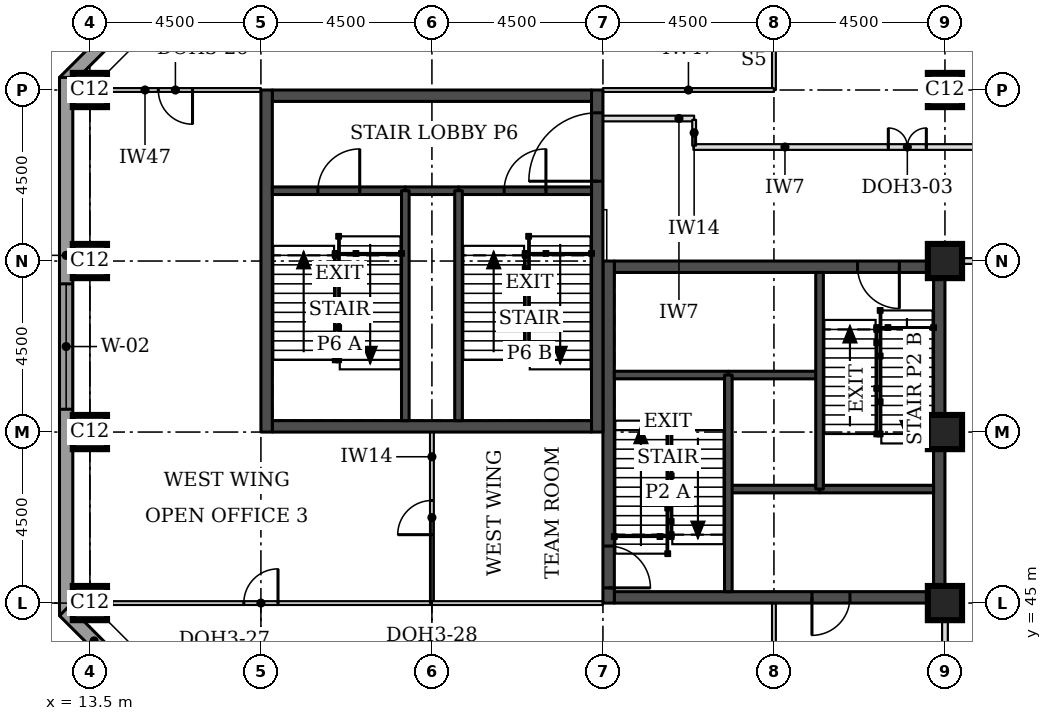
"""IFC4 building model, lengths in metres.
Left out: names, types, materials, properties, quantities, classifications, styles, units other than length and angle.
Written with IfcOpenShell. Run it as: python <this file> out.ifc"""

import sys

from ifc_helpers import new_model, si_unit, direction, frame, frame_2d, origin, origin_2d, place, context, subcontext, project, spatial, rectangle, extrude, element, fill, save


model = new_model("IFC4")
c1 = context("Model", 3, precision=1e-05, world=origin(), true_north=direction((0.0, 1.0)))
c2 = subcontext(c1, "Body", "Model", "MODEL_VIEW")
j1 = project(units=[si_unit("LENGTHUNIT", "METRE"), si_unit("PLANEANGLEUNIT", "RADIAN")], contexts=[c1])
p1 = place(None, origin())
s1 = spatial("IfcSite", under=j1, at=p1, CompositionType="ELEMENT")
p2 = place(p1, origin())
s2 = spatial("IfcBuilding", under=s1, at=p2, CompositionType="ELEMENT")
p3 = place(p2, frame((0.0, 0.0, 162.5)))
s3 = spatial("IfcBuildingStorey", under=s2, at=p3, CompositionType="ELEMENT", Elevation=162.5)
for number, where, z_axis, x_axis in (
    (1, (13.5, 45.0, 0.0), (0.0, 0.0, 1.0), (1.0, 0.0, 0.0)),
    (2, (36.0, 45.0, 0.0), (0.0, 0.0, 1.0), (1.0, 0.0, 0.0)),
    (3, (13.5, 49.5, 0.0), (0.0, 0.0, 1.0), (1.0, 0.0, 0.0)),
    (4, (36.0, 49.5, 0.0), (0.0, 0.0, 1.0), (1.0, 0.0, 0.0)),
    (5, (13.5, 54.0, 0.0), (0.0, 0.0, 1.0), (1.0, 0.0, 0.0)),
    (6, (36.0, 54.0, 0.0), (0.0, 0.0, 1.0), (1.0, 0.0, 0.0)),
    (7, (13.5, 58.5, 0.0), (0.0, 0.0, 1.0), (1.0, 0.0, 0.0)),
    (8, (36.0, 58.5, 0.0), (0.0, 0.0, 1.0), (1.0, 0.0, 0.0)),
):
    element("IfcColumn", number, at=place(p3, frame(where, z_axis=z_axis, x_axis=x_axis)), inside=s3, PredefinedType="COLUMN", context=c2, shape_type="SweptSolid", body=[
        extrude(rectangle(XDim=0.9, YDim=0.9, at=origin_2d()), origin(), (0.0, 0.0, 1.0), 3.7),
    ])
p4 = place(p3, frame((27.3, 45.15, 0.0), z_axis=(0.0, 0.0, 1.0), x_axis=(1.0, 0.0, 0.0)))
e9 = element("IfcWall", 9, at=p4, inside=s3, PredefinedType="SHEAR", context=c2, shape_type="SweptSolid", body=[
    extrude(rectangle(XDim=8.4, YDim=0.3, at=frame_2d((4.2, 0.0))), origin(), (0.0, 0.0, 1.0), 3.7),
])
p5 = place(p4, frame((5.2, 0.0, 0.0)))
e10 = element("IfcOpeningElement", 10, at=p5, cuts=e9, PredefinedType="OPENING", context=c2, shape_type="SweptSolid", body=[
    extrude(rectangle(XDim=1.0, YDim=2.1, at=frame_2d((0.5, 1.05))), frame((0.0, 0.16, 0.0), z_axis=(0.0, -1.0, 0.0), x_axis=(1.0, 0.0, 0.0)), (0.0, 0.0, 1.0), 0.32),
])
p6 = place(p3, frame((27.3, 53.85, 0.0), z_axis=(0.0, 0.0, 1.0), x_axis=(1.0, 0.0, 0.0)))
e11 = element("IfcWall", 11, at=p6, inside=s3, PredefinedType="SHEAR", context=c2, shape_type="SweptSolid", body=[
    extrude(rectangle(XDim=8.4, YDim=0.3, at=frame_2d((4.2, 0.0))), origin(), (0.0, 0.0, 1.0), 3.7),
])
p7 = place(p6, frame((6.4, 0.0, 0.0)))
e12 = element("IfcOpeningElement", 12, at=p7, cuts=e11, PredefinedType="OPENING", context=c2, shape_type="SweptSolid", body=[
    extrude(rectangle(XDim=1.1, YDim=2.1, at=frame_2d((0.55, 1.05))), frame((0.0, 0.16, 0.0), z_axis=(0.0, -1.0, 0.0), x_axis=(1.0, 0.0, 0.0)), (0.0, 0.0, 1.0), 0.32),
])
p8 = place(p3, frame((27.15, 45.0, 0.0), z_axis=(0.0, 0.0, 1.0), x_axis=(0.0, 1.0, 0.0)))
e13 = element("IfcWall", 13, at=p8, inside=s3, PredefinedType="SHEAR", context=c2, shape_type="SweptSolid", body=[
    extrude(rectangle(XDim=9.0, YDim=0.3, at=frame_2d((4.5, 0.0))), origin(), (0.0, 0.0, 1.0), 3.7),
])
p9 = place(p8, frame((0.4, 0.0, 0.0)))
e14 = element("IfcOpeningElement", 14, at=p9, cuts=e13, PredefinedType="OPENING", context=c2, shape_type="SweptSolid", body=[
    extrude(rectangle(XDim=1.1, YDim=2.1, at=frame_2d((0.55, 1.05))), frame((0.0, 0.16, 0.0), z_axis=(0.0, -1.0, 0.0), x_axis=(1.0, 0.0, 0.0)), (0.0, 0.0, 1.0), 0.32),
])
p10 = place(p3, frame((35.85, 45.0, 0.0), z_axis=(0.0, 0.0, 1.0), x_axis=(0.0, 1.0, 0.0)))
e15 = element("IfcWall", 15, at=p10, inside=s3, PredefinedType="SHEAR", context=c2, shape_type="SweptSolid", body=[
    extrude(rectangle(XDim=9.0, YDim=0.3, at=frame_2d((4.5, 0.0))), origin(), (0.0, 0.0, 1.0), 3.7),
])
for number, where, z_axis, x_axis in (
    (16, (18.3, 49.65, 0.0), (0.0, 0.0, 1.0), (1.0, 0.0, 0.0)),
    (17, (18.3, 58.35, 0.0), (0.0, 0.0, 1.0), (1.0, 0.0, 0.0)),
):
    element("IfcWall", number, at=place(p3, frame(where, z_axis=z_axis, x_axis=x_axis)), inside=s3, PredefinedType="SHEAR", context=c2, shape_type="SweptSolid", body=[
        extrude(rectangle(XDim=8.4, YDim=0.3, at=frame_2d((4.2, 0.0))), origin(), (0.0, 0.0, 1.0), 3.7),
    ])
p11 = place(p3, frame((18.15, 49.5, 0.0), z_axis=(0.0, 0.0, 1.0), x_axis=(0.0, 1.0, 0.0)))
e18 = element("IfcWall", 18, at=p11, inside=s3, PredefinedType="SHEAR", context=c2, shape_type="SweptSolid", body=[
    extrude(rectangle(XDim=9.0, YDim=0.3, at=frame_2d((4.5, 0.0))), origin(), (0.0, 0.0, 1.0), 3.7),
])
p12 = place(p3, frame((26.85, 49.5, 0.0), z_axis=(0.0, 0.0, 1.0), x_axis=(0.0, 1.0, 0.0)))
e19 = element("IfcWall", 19, at=p12, inside=s3, PredefinedType="SHEAR", context=c2, shape_type="SweptSolid", body=[
    extrude(rectangle(XDim=9.0, YDim=0.3, at=frame_2d((4.5, 0.0))), origin(), (0.0, 0.0, 1.0), 3.7),
])
p13 = place(p12, frame((6.6, 0.0, 0.0)))
e20 = element("IfcOpeningElement", 20, at=p13, cuts=e19, PredefinedType="OPENING", context=c2, shape_type="SweptSolid", body=[
    extrude(rectangle(XDim=1.8, YDim=2.1, at=frame_2d((0.9, 1.05))), frame((0.0, 0.16, 0.0), z_axis=(0.0, -1.0, 0.0), x_axis=(1.0, 0.0, 0.0)), (0.0, 0.0, 1.0), 0.32),
])
p14 = place(p3, frame((17.792, 63.676, 0.0), z_axis=(0.0, 0.0, 1.0), x_axis=(-0.707106781187, -0.707106781187, 0.0)))
e21 = element("IfcWall", 21, at=p14, inside=s3, PredefinedType="STANDARD", context=c2, shape_type="SweptSolid", body=[
    extrude(rectangle(XDim=7.027, YDim=0.35, at=frame_2d((3.513, 0.0))), origin(), (0.0, 0.0, 1.0), 3.525),
])
p15 = place(p14, frame((1.863, 0.0, 0.9)))
e22 = element("IfcOpeningElement", 22, at=p15, cuts=e21, PredefinedType="OPENING", context=c2, shape_type="SweptSolid", body=[
    extrude(rectangle(XDim=3.3, YDim=1.9, at=frame_2d((1.65, 0.95))), frame((0.0, 0.185, 0.0), z_axis=(0.0, -1.0, 0.0), x_axis=(1.0, 0.0, 0.0)), (0.0, 0.0, 1.0), 0.37),
])
p16 = place(p3, frame((12.875, 58.831, 0.0), z_axis=(0.0, 0.0, 1.0), x_axis=(0.0, -1.0, 0.0)))
e23 = element("IfcWall", 23, at=p16, inside=s3, PredefinedType="STANDARD", context=c2, shape_type="SweptSolid", body=[
    extrude(rectangle(XDim=14.163, YDim=0.35, at=frame_2d((7.081, 0.0))), origin(), (0.0, 0.0, 1.0), 3.525),
])
p17 = place(p16, frame((5.431, 0.0, 0.9)))
e24 = element("IfcOpeningElement", 24, at=p17, cuts=e23, PredefinedType="OPENING", context=c2, shape_type="SweptSolid", body=[
    extrude(rectangle(XDim=3.3, YDim=1.9, at=frame_2d((1.65, 0.95))), frame((0.0, 0.185, 0.0), z_axis=(0.0, -1.0, 0.0), x_axis=(1.0, 0.0, 0.0)), (0.0, 0.0, 1.0), 0.37),
])
p18 = place(p3, frame((12.824, 44.792, 0.0), z_axis=(0.0, 0.0, 1.0), x_axis=(0.707106781187, -0.707106781187, 0.0)))
e25 = element("IfcWall", 25, at=p18, inside=s3, PredefinedType="STANDARD", context=c2, shape_type="SweptSolid", body=[
    extrude(rectangle(XDim=7.027, YDim=0.35, at=frame_2d((3.513, 0.0))), origin(), (0.0, 0.0, 1.0), 3.525),
])
p19 = place(p18, frame((1.863, 0.0, 0.9)))
e26 = element("IfcOpeningElement", 26, at=p19, cuts=e25, PredefinedType="OPENING", context=c2, shape_type="SweptSolid", body=[
    extrude(rectangle(XDim=3.3, YDim=1.9, at=frame_2d((1.65, 0.95))), frame((0.0, 0.185, 0.0), z_axis=(0.0, -1.0, 0.0), x_axis=(1.0, 0.0, 0.0)), (0.0, 0.0, 1.0), 0.37),
])
p20 = place(p3, frame((36.45, 54.0, 0.0), z_axis=(0.0, 0.0, 1.0), x_axis=(1.0, 0.0, 0.0)))
e27 = element("IfcWall", 27, at=p20, inside=s3, PredefinedType="PARTITIONING", context=c2, shape_type="SweptSolid", body=[
    extrude(rectangle(XDim=5.625, YDim=0.15, at=frame_2d((2.812, 0.0))), origin(), (0.0, 0.0, 1.0), 3.55),
])
p21 = place(p3, frame((29.38, 57.0, 0.0), z_axis=(0.0, 0.0, 1.0), x_axis=(1.0, 0.0, 0.0)))
e28 = element("IfcWall", 28, at=p21, inside=s3, PredefinedType="PARTITIONING", context=c2, shape_type="SweptSolid", body=[
    extrude(rectangle(XDim=9.62, YDim=0.15, at=frame_2d((4.81, 0.0))), origin(), (0.0, 0.0, 1.0), 3.55),
])
p22 = place(p21, frame((5.13, 0.0, 0.0)))
e29 = element("IfcOpeningElement", 29, at=p22, cuts=e28, PredefinedType="OPENING", context=c2, shape_type="SweptSolid", body=[
    extrude(rectangle(XDim=1.0, YDim=2.1, at=frame_2d((0.5, 1.05))), frame((0.0, 0.085, 0.0), z_axis=(0.0, -1.0, 0.0), x_axis=(1.0, 0.0, 0.0)), (0.0, 0.0, 1.0), 0.17),
])
p23 = place(p3, frame((36.0, 40.95, 0.0), z_axis=(0.0, 0.0, 1.0), x_axis=(0.0, 1.0, 0.0)))
e30 = element("IfcWall", 30, at=p23, inside=s3, PredefinedType="PARTITIONING", context=c2, shape_type="SweptSolid", body=[
    extrude(rectangle(XDim=3.63, YDim=0.15, at=frame_2d((1.815, 0.0))), origin(), (0.0, 0.0, 1.0), 2.8),
])
p24 = place(p23, frame((1.4, 0.0, 0.0)))
e31 = element("IfcOpeningElement", 31, at=p24, cuts=e30, PredefinedType="OPENING", context=c2, shape_type="SweptSolid", body=[
    extrude(rectangle(XDim=0.9, YDim=2.1, at=frame_2d((0.45, 1.05))), frame((0.0, 0.085, 0.0), z_axis=(0.0, -1.0, 0.0), x_axis=(1.0, 0.0, 0.0)), (0.0, 0.0, 1.0), 0.17),
])
p25 = place(p3, frame((31.5, 63.0, 0.0), z_axis=(0.0, 0.0, 1.0), x_axis=(0.0, -1.0, 0.0)))
e32 = element("IfcWall", 32, at=p25, inside=s3, PredefinedType="PARTITIONING", context=c2, shape_type="SweptSolid", body=[
    extrude(rectangle(XDim=4.5, YDim=0.1, at=frame_2d((2.25, 0.0))), origin(), (0.0, 0.0, 1.0), 3.55),
])
p26 = place(p25, frame((1.8, 0.0, 0.0)))
e33 = element("IfcOpeningElement", 33, at=p26, cuts=e32, PredefinedType="OPENING", context=c2, shape_type="SweptSolid", body=[
    extrude(rectangle(XDim=0.9, YDim=2.1, at=frame_2d((0.45, 1.05))), frame((0.0, 0.06, 0.0), z_axis=(0.0, -1.0, 0.0), x_axis=(1.0, 0.0, 0.0)), (0.0, 0.0, 1.0), 0.12),
])
p27 = place(p3, frame((31.5, 58.5, 0.0), z_axis=(0.0, 0.0, 1.0), x_axis=(-1.0, 0.0, 0.0)))
e34 = element("IfcWall", 34, at=p27, inside=s3, PredefinedType="PARTITIONING", context=c2, shape_type="SweptSolid", body=[
    extrude(rectangle(XDim=4.5, YDim=0.1, at=frame_2d((2.25, 0.0))), origin(), (0.0, 0.0, 1.0), 2.55),
])
p28 = place(p3, frame((13.5, 58.5, 0.0), z_axis=(0.0, 0.0, 1.0), x_axis=(1.0, 0.0, 0.0)))
e35 = element("IfcWall", 35, at=p28, inside=s3, PredefinedType="PARTITIONING", context=c2, shape_type="SweptSolid", body=[
    extrude(rectangle(XDim=4.5, YDim=0.1, at=frame_2d((2.25, 0.0))), origin(), (0.0, 0.0, 1.0), 2.55),
])
p29 = place(p28, frame((1.8, 0.0, 0.0)))
e36 = element("IfcOpeningElement", 36, at=p29, cuts=e35, PredefinedType="OPENING", context=c2, shape_type="SweptSolid", body=[
    extrude(rectangle(XDim=0.9, YDim=2.1, at=frame_2d((0.45, 1.05))), frame((0.0, 0.06, 0.0), z_axis=(0.0, -1.0, 0.0), x_axis=(1.0, 0.0, 0.0)), (0.0, 0.0, 1.0), 0.12),
])
p30 = place(p3, frame((22.5, 45.0, 0.0), z_axis=(0.0, 0.0, 1.0), x_axis=(-1.0, 0.0, 0.0)))
e37 = element("IfcWall", 37, at=p30, inside=s3, PredefinedType="PARTITIONING", context=c2, shape_type="SweptSolid", body=[
    extrude(rectangle(XDim=9.0, YDim=0.1, at=frame_2d((4.5, 0.0))), origin(), (0.0, 0.0, 1.0), 2.55),
])
p31 = place(p30, frame((4.05, 0.0, 0.0)))
e38 = element("IfcOpeningElement", 38, at=p31, cuts=e37, PredefinedType="OPENING", context=c2, shape_type="SweptSolid", body=[
    extrude(rectangle(XDim=0.9, YDim=2.1, at=frame_2d((0.45, 1.05))), frame((0.0, 0.06, 0.0), z_axis=(0.0, -1.0, 0.0), x_axis=(1.0, 0.0, 0.0)), (0.0, 0.0, 1.0), 0.12),
])
p32 = place(p3, frame((22.5, 49.5, 0.0), z_axis=(0.0, 0.0, 1.0), x_axis=(0.0, -1.0, 0.0)))
e39 = element("IfcWall", 39, at=p32, inside=s3, PredefinedType="PARTITIONING", context=c2, shape_type="SweptSolid", body=[
    extrude(rectangle(XDim=4.5, YDim=0.1, at=frame_2d((2.25, 0.0))), origin(), (0.0, 0.0, 1.0), 3.55),
])
p33 = place(p32, frame((1.8, 0.0, 0.0)))
e40 = element("IfcOpeningElement", 40, at=p33, cuts=e39, PredefinedType="OPENING", context=c2, shape_type="SweptSolid", body=[
    extrude(rectangle(XDim=0.9, YDim=2.1, at=frame_2d((0.45, 1.05))), frame((0.0, 0.06, 0.0), z_axis=(0.0, -1.0, 0.0), x_axis=(1.0, 0.0, 0.0)), (0.0, 0.0, 1.0), 0.12),
])
p34 = place(p3, frame((22.5, 45.0, 0.0), z_axis=(0.0, 0.0, 1.0), x_axis=(1.0, 0.0, 0.0)))
e41 = element("IfcWall", 41, at=p34, inside=s3, PredefinedType="PARTITIONING", context=c2, shape_type="SweptSolid", body=[
    extrude(rectangle(XDim=4.5, YDim=0.1, at=frame_2d((2.25, 0.0))), origin(), (0.0, 0.0, 1.0), 2.55),
])
p35 = place(p3, frame((31.5, 45.0, 0.0), z_axis=(0.0, 0.0, 1.0), x_axis=(0.0, -1.0, 0.0)))
e42 = element("IfcWall", 42, at=p35, inside=s3, PredefinedType="PARTITIONING", context=c2, shape_type="SweptSolid", body=[
    extrude(rectangle(XDim=4.5, YDim=0.1, at=frame_2d((2.25, 0.0))), origin(), (0.0, 0.0, 1.0), 3.55),
])
p36 = place(p35, frame((1.8, 0.0, 0.0)))
e43 = element("IfcOpeningElement", 43, at=p36, cuts=e42, PredefinedType="OPENING", context=c2, shape_type="SweptSolid", body=[
    extrude(rectangle(XDim=0.9, YDim=2.1, at=frame_2d((0.45, 1.05))), frame((0.0, 0.06, 0.0), z_axis=(0.0, -1.0, 0.0), x_axis=(1.0, 0.0, 0.0)), (0.0, 0.0, 1.0), 0.12),
])
p37 = place(p3, frame((27.0, 57.75, 0.0), z_axis=(0.0, 0.0, 1.0), x_axis=(1.0, 0.0, 0.0)))
e44 = element("IfcWall", 44, at=p37, inside=s3, PredefinedType="PARTITIONING", context=c2, shape_type="SweptSolid", body=[
    extrude(rectangle(XDim=2.4, YDim=0.15, at=frame_2d((1.2, 0.0))), origin(), (0.0, 0.0, 1.0), 3.55),
])
p38 = place(p3, frame((29.4, 57.715, 0.0), z_axis=(0.0, 0.0, 1.0), x_axis=(0.0, -1.0, 0.0)))
e45 = element("IfcWall", 45, at=p38, inside=s3, PredefinedType="PARTITIONING", context=c2, shape_type="SweptSolid", body=[
    extrude(rectangle(XDim=0.68, YDim=0.1, at=frame_2d((0.34, 0.0))), origin(), (0.0, 0.0, 1.0), 3.55),
])
p39 = place(p3, frame((30.3, 48.0, 0.0), z_axis=(0.0, 0.0, 1.0), x_axis=(1.0, 0.0, 0.0)))
e46 = element("IfcWall", 46, at=p39, inside=s3, PredefinedType="SOLIDWALL", context=c2, shape_type="SweptSolid", body=[
    extrude(rectangle(XDim=2.4, YDim=0.2, at=frame_2d((1.2, 0.0))), origin(), (0.0, 0.0, 1.0), 3.55),
])
p40 = place(p3, frame((32.7, 48.0, 0.0), z_axis=(0.0, 0.0, 1.0), x_axis=(1.0, 0.0, 0.0)))
e47 = element("IfcWall", 47, at=p40, inside=s3, PredefinedType="SOLIDWALL", context=c2, shape_type="SweptSolid", body=[
    extrude(rectangle(XDim=3.0, YDim=0.2, at=frame_2d((1.5, 0.0))), origin(), (0.0, 0.0, 1.0), 3.55),
])
p41 = place(p3, frame((30.3, 51.0, 0.0), z_axis=(0.0, 0.0, 1.0), x_axis=(1.0, 0.0, 0.0)))
e48 = element("IfcWall", 48, at=p41, inside=s3, PredefinedType="SOLIDWALL", context=c2, shape_type="SweptSolid", body=[
    extrude(rectangle(XDim=2.4, YDim=0.2, at=frame_2d((1.2, 0.0))), origin(), (0.0, 0.0, 1.0), 3.7),
])
p42 = place(p3, frame((27.3, 51.0, 0.0), z_axis=(0.0, 0.0, 1.0), x_axis=(1.0, 0.0, 0.0)))
e49 = element("IfcWall", 49, at=p42, inside=s3, PredefinedType="SOLIDWALL", context=c2, shape_type="SweptSolid", body=[
    extrude(rectangle(XDim=3.0, YDim=0.2, at=frame_2d((1.5, 0.0))), origin(), (0.0, 0.0, 1.0), 3.55),
])
for number, where, z_axis, x_axis in (
    (50, (30.3, 45.3, 0.0), (0.0, 0.0, 1.0), (0.0, 1.0, 0.0)),
    (51, (32.7, 48.0, 0.0), (0.0, 0.0, 1.0), (0.0, 1.0, 0.0)),
):
    element("IfcWall", number, at=place(p3, frame(where, z_axis=z_axis, x_axis=x_axis)), inside=s3, PredefinedType="SOLIDWALL", context=c2, shape_type="SweptSolid", body=[
        extrude(rectangle(XDim=5.7, YDim=0.2, at=frame_2d((2.85, 0.0))), origin(), (0.0, 0.0, 1.0), 3.55),
    ])
p43 = place(p3, frame((21.8, 55.85, 0.0), z_axis=(0.0, 0.0, 1.0), x_axis=(1.0, 0.0, 0.0)))
e52 = element("IfcWall", 52, at=p43, inside=s3, PredefinedType="SOLIDWALL", context=c2, shape_type="SweptSolid", body=[
    extrude(rectangle(XDim=1.4, YDim=0.2, at=frame_2d((0.7, 0.0))), origin(), (0.0, 0.0, 1.0), 3.55),
])
p44 = place(p3, frame((18.3, 55.85, 0.0), z_axis=(0.0, 0.0, 1.0), x_axis=(1.0, 0.0, 0.0)))
e53 = element("IfcWall", 53, at=p44, inside=s3, PredefinedType="SOLIDWALL", context=c2, shape_type="SweptSolid", body=[
    extrude(rectangle(XDim=3.5, YDim=0.2, at=frame_2d((1.75, 0.0))), origin(), (0.0, 0.0, 1.0), 3.55),
])
p45 = place(p44, frame((1.2, 0.0, 0.0)))
e54 = element("IfcOpeningElement", 54, at=p45, cuts=e53, PredefinedType="OPENING", context=c2, shape_type="SweptSolid", body=[
    extrude(rectangle(XDim=1.1, YDim=2.1, at=frame_2d((0.55, 1.05))), frame((0.0, 0.11, 0.0), z_axis=(0.0, -1.0, 0.0), x_axis=(1.0, 0.0, 0.0)), (0.0, 0.0, 1.0), 0.22),
])
p46 = place(p3, frame((23.2, 55.85, 0.0), z_axis=(0.0, 0.0, 1.0), x_axis=(1.0, 0.0, 0.0)))
e55 = element("IfcWall", 55, at=p46, inside=s3, PredefinedType="SOLIDWALL", context=c2, shape_type="SweptSolid", body=[
    extrude(rectangle(XDim=3.5, YDim=0.2, at=frame_2d((1.75, 0.0))), origin(), (0.0, 0.0, 1.0), 3.55),
])
p47 = place(p46, frame((1.2, 0.0, 0.0)))
e56 = element("IfcOpeningElement", 56, at=p47, cuts=e55, PredefinedType="OPENING", context=c2, shape_type="SweptSolid", body=[
    extrude(rectangle(XDim=1.1, YDim=2.1, at=frame_2d((0.55, 1.05))), frame((0.0, 0.11, 0.0), z_axis=(0.0, -1.0, 0.0), x_axis=(1.0, 0.0, 0.0)), (0.0, 0.0, 1.0), 0.22),
])
for number, where, z_axis, x_axis in (
    (57, (21.8, 49.8, 0.0), (0.0, 0.0, 1.0), (0.0, 1.0, 0.0)),
    (58, (23.2, 49.8, 0.0), (0.0, 0.0, 1.0), (0.0, 1.0, 0.0)),
):
    element("IfcWall", number, at=place(p3, frame(where, z_axis=z_axis, x_axis=x_axis)), inside=s3, PredefinedType="SOLIDWALL", context=c2, shape_type="SweptSolid", body=[
        extrude(rectangle(XDim=6.05, YDim=0.2, at=frame_2d((3.025, 0.0))), origin(), (0.0, 0.0, 1.0), 3.55),
    ])
p48 = place(p17, origin())
e59 = element("IfcWindow", 59, at=p48, inside=s3, PartitioningType="SINGLE_PANEL", PredefinedType="WINDOW", context=c2, shape_type="SweptSolid", body=[
    extrude(rectangle(XDim=3.3, YDim=1.9, at=frame_2d((1.65, 0.95))), frame((0.0, 0.085, 0.0), z_axis=(0.0, -1.0, 0.0), x_axis=(1.0, 0.0, 0.0)), (0.0, 0.0, 1.0), 0.06),
])
fill(e24, e59)
p49 = place(p22, origin())
e60 = element("IfcDoor", 60, at=p49, inside=s3, OperationType="DOUBLE_DOOR_SINGLE_SWING", PredefinedType="DOOR", context=c2, shape_type="SweptSolid", body=[
    extrude(rectangle(XDim=1.0, YDim=2.1, at=frame_2d((0.5, 1.05))), frame((0.0, 0.025, 0.0), z_axis=(0.0, -1.0, 0.0), x_axis=(1.0, 0.0, 0.0)), (0.0, 0.0, 1.0), 0.05),
])
fill(e29, e60)
p50 = place(p29, frame((0.9, 0.0, 0.0), z_axis=(0.0, 0.0, 1.0), x_axis=(-1.0, 0.0, 0.0)))
e61 = element("IfcDoor", 61, at=p50, inside=s3, OperationType="SINGLE_SWING_LEFT", PredefinedType="DOOR", context=c2, shape_type="SweptSolid", body=[
    extrude(rectangle(XDim=0.9, YDim=2.1, at=frame_2d((0.45, 1.05))), frame((0.0, 0.025, 0.0), z_axis=(0.0, -1.0, 0.0), x_axis=(1.0, 0.0, 0.0)), (0.0, 0.0, 1.0), 0.05),
])
fill(e36, e61)
p51 = place(p31, frame((0.9, 0.0, 0.0), z_axis=(0.0, 0.0, 1.0), x_axis=(-1.0, 0.0, 0.0)))
e62 = element("IfcDoor", 62, at=p51, inside=s3, OperationType="SINGLE_SWING_RIGHT", PredefinedType="DOOR", context=c2, shape_type="SweptSolid", body=[
    extrude(rectangle(XDim=0.9, YDim=2.1, at=frame_2d((0.45, 1.05))), frame((0.0, 0.025, 0.0), z_axis=(0.0, -1.0, 0.0), x_axis=(1.0, 0.0, 0.0)), (0.0, 0.0, 1.0), 0.05),
])
fill(e38, e62)
p52 = place(p33, frame((0.9, 0.0, 0.0), z_axis=(0.0, 0.0, 1.0), x_axis=(-1.0, 0.0, 0.0)))
e63 = element("IfcDoor", 63, at=p52, inside=s3, OperationType="SINGLE_SWING_LEFT", PredefinedType="DOOR", context=c2, shape_type="SweptSolid", body=[
    extrude(rectangle(XDim=0.9, YDim=2.1, at=frame_2d((0.45, 1.05))), frame((0.0, 0.025, 0.0), z_axis=(0.0, -1.0, 0.0), x_axis=(1.0, 0.0, 0.0)), (0.0, 0.0, 1.0), 0.05),
])
fill(e40, e63)
p53 = place(p9, frame((1.1, 0.0, 0.0), z_axis=(0.0, 0.0, 1.0), x_axis=(-1.0, 0.0, 0.0)))
e64 = element("IfcDoor", 64, at=p53, inside=s3, OperationType="SINGLE_SWING_RIGHT", PredefinedType="DOOR", context=c2, shape_type="SweptSolid", body=[
    extrude(rectangle(XDim=1.1, YDim=2.1, at=frame_2d((0.55, 1.05))), frame((0.0, 0.025, 0.0), z_axis=(0.0, -1.0, 0.0), x_axis=(1.0, 0.0, 0.0)), (0.0, 0.0, 1.0), 0.05),
])
fill(e14, e64)
p54 = place(p7, frame((1.1, 0.0, 0.0), z_axis=(0.0, 0.0, 1.0), x_axis=(-1.0, 0.0, 0.0)))
e65 = element("IfcDoor", 65, at=p54, inside=s3, OperationType="SINGLE_SWING_LEFT", PredefinedType="DOOR", context=c2, shape_type="SweptSolid", body=[
    extrude(rectangle(XDim=1.1, YDim=2.1, at=frame_2d((0.55, 1.05))), frame((0.0, 0.025, 0.0), z_axis=(0.0, -1.0, 0.0), x_axis=(1.0, 0.0, 0.0)), (0.0, 0.0, 1.0), 0.05),
])
fill(e12, e65)
p55 = place(p5, frame((1.0, 0.0, 0.0), z_axis=(0.0, 0.0, 1.0), x_axis=(-1.0, 0.0, 0.0)))
e66 = element("IfcDoor", 66, at=p55, inside=s3, OperationType="SINGLE_SWING_RIGHT", PredefinedType="DOOR", context=c2, shape_type="SweptSolid", body=[
    extrude(rectangle(XDim=1.0, YDim=2.1, at=frame_2d((0.5, 1.05))), frame((0.0, 0.025, 0.0), z_axis=(0.0, -1.0, 0.0), x_axis=(1.0, 0.0, 0.0)), (0.0, 0.0, 1.0), 0.05),
])
fill(e10, e66)
p56 = place(p45, origin())
e67 = element("IfcDoor", 67, at=p56, inside=s3, OperationType="SINGLE_SWING_RIGHT", PredefinedType="DOOR", context=c2, shape_type="SweptSolid", body=[
    extrude(rectangle(XDim=1.1, YDim=2.1, at=frame_2d((0.55, 1.05))), frame((0.0, 0.025, 0.0), z_axis=(0.0, -1.0, 0.0), x_axis=(1.0, 0.0, 0.0)), (0.0, 0.0, 1.0), 0.05),
])
fill(e54, e67)
p57 = place(p47, origin())
e68 = element("IfcDoor", 68, at=p57, inside=s3, OperationType="SINGLE_SWING_RIGHT", PredefinedType="DOOR", context=c2, shape_type="SweptSolid", body=[
    extrude(rectangle(XDim=1.1, YDim=2.1, at=frame_2d((0.55, 1.05))), frame((0.0, 0.025, 0.0), z_axis=(0.0, -1.0, 0.0), x_axis=(1.0, 0.0, 0.0)), (0.0, 0.0, 1.0), 0.05),
])
fill(e56, e68)
p58 = place(p13, origin())
e69 = element("IfcDoor", 69, at=p58, inside=s3, OperationType="SINGLE_SWING_LEFT", PredefinedType="DOOR", context=c2, shape_type="SweptSolid", body=[
    extrude(rectangle(XDim=1.8, YDim=2.1, at=frame_2d((0.9, 1.05))), frame((0.0, 0.025, 0.0), z_axis=(0.0, -1.0, 0.0), x_axis=(1.0, 0.0, 0.0)), (0.0, 0.0, 1.0), 0.05),
])
fill(e20, e69)
save(model, sys.argv[1])
